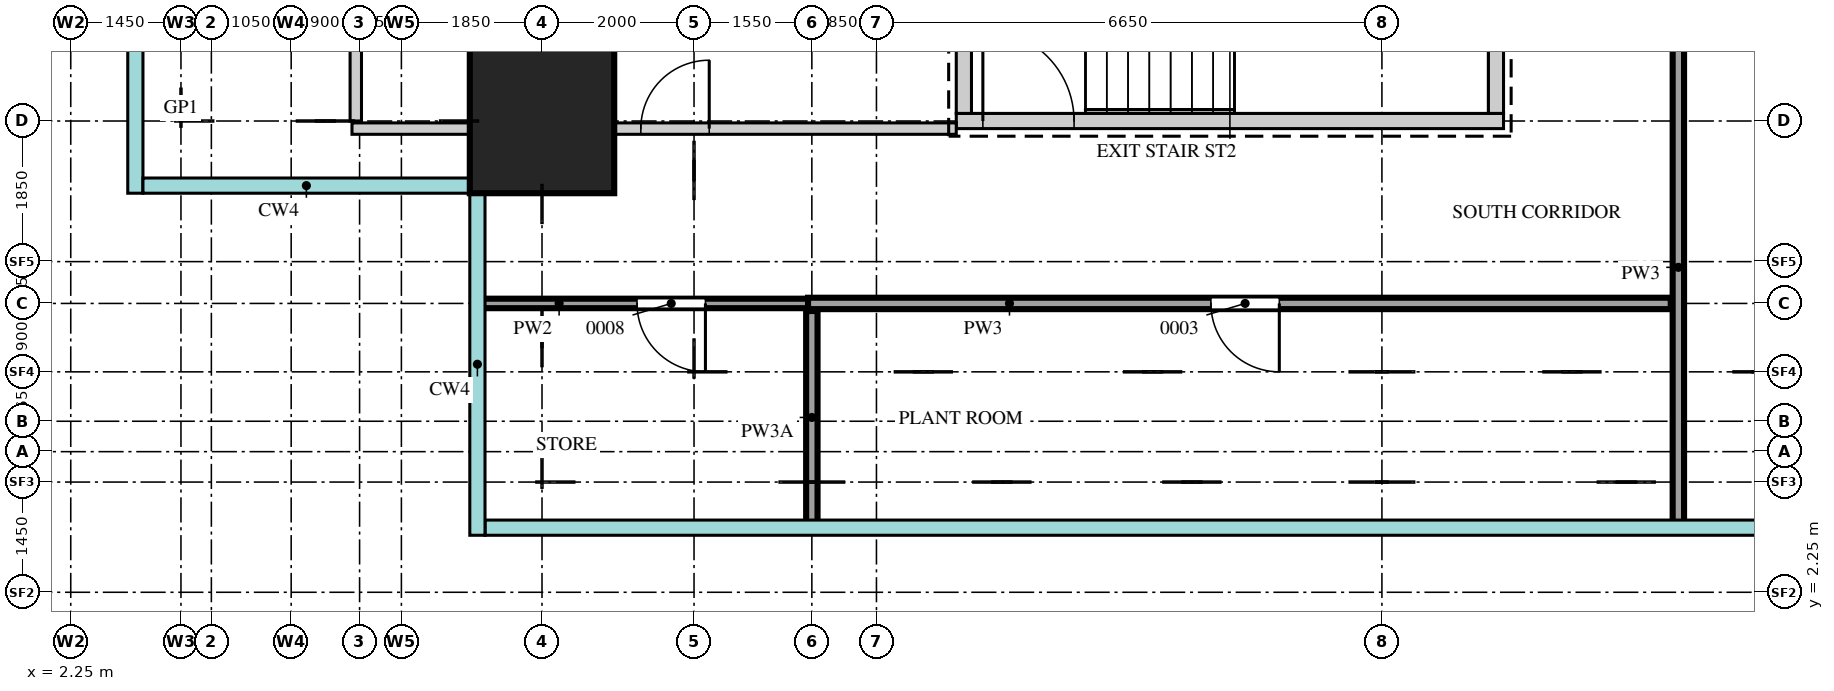
"""IFC4 building model, lengths in metres.
Left out: names, types, materials, properties, quantities, classifications, styles, units other than length and angle.
Written with IfcOpenShell. Run it as: python <this file> out.ifc"""

import sys

from ifc_helpers import new_model, si_unit, direction, frame, frame_2d, origin, origin_2d, place, context, subcontext, project, spatial, rectangle, extrude, source, transform, mapped, element, fill, save


model = new_model("IFC4")
c1 = context("Model", 3, precision=1e-05, world=origin(), true_north=direction((0.0, 1.0)))
c2 = subcontext(c1, "Body", "Model", "MODEL_VIEW")
j1 = project(units=[si_unit("LENGTHUNIT", "METRE"), si_unit("PLANEANGLEUNIT", "RADIAN")], contexts=[c1])
p1 = place(None, origin())
s1 = spatial("IfcSite", under=j1, at=p1, CompositionType="ELEMENT")
p2 = place(p1, origin())
s2 = spatial("IfcBuilding", under=s1, at=p2, CompositionType="ELEMENT")
p3 = place(p2, frame((0.0, 0.0, 216.7)))
s3 = spatial("IfcBuildingStorey", under=s2, at=p3, CompositionType="ELEMENT", Elevation=216.7)
m1 = source(origin(), c2, "Body", "SweptSolid", [
    extrude(rectangle(XDim=7.2, YDim=0.2, at=frame_2d((3.6, 0.0))), origin(), (0.0, 0.0, 1.0), 5.25),
])
p4 = place(p3, frame((13.9, 8.45, 0.0), z_axis=(0.0, 0.0, 1.0), x_axis=(1.0, 0.0, 0.0)))
e1 = element("IfcWall", 1, at=p4, inside=s3, PredefinedType="SHEAR", context=c2, shape_type="MappedRepresentation", body=[
    mapped(m1, transform((0.0, 0.0, 0.0))),
])
m2 = source(origin(), c2, "Body", "SweptSolid", [
    extrude(rectangle(XDim=1.2, YDim=2.1, at=frame_2d((0.6, 1.05))), frame((0.0, 0.11, 0.0), z_axis=(0.0, -1.0, 0.0), x_axis=(1.0, 0.0, 0.0)), (0.0, 0.0, 1.0), 0.22),
])
p5 = place(p4, frame((0.35, 0.0, 0.0)))
e2 = element("IfcOpeningElement", 2, at=p5, cuts=e1, PredefinedType="OPENING", context=c2, shape_type="MappedRepresentation", body=[
    mapped(m2, transform((0.0, 0.0, 0.0))),
])
m3 = source(origin(), c2, "Body", "SweptSolid", [
    extrude(rectangle(XDim=3.35, YDim=0.2, at=frame_2d((1.675, 0.0))), origin(), (0.0, 0.0, 1.0), 5.25),
])
for number, where, z_axis, x_axis in (
    (3, (21.0, 8.55, 0.0), (0.0, 0.0, 1.0), (0.0, 1.0, 0.0)),
    (4, (14.0, 8.55, 0.0), (0.0, 0.0, 1.0), (0.0, 1.0, 0.0)),
):
    element("IfcWall", number, at=place(p3, frame(where, z_axis=z_axis, x_axis=x_axis)), inside=s3, PredefinedType="SHEAR", context=c2, shape_type="MappedRepresentation", body=[
        mapped(m3, transform((0.0, 0.0, 0.0))),
    ])
m4 = source(origin(), c2, "Body", "SweptSolid", [
    extrude(rectangle(XDim=1.9, YDim=1.9, at=origin_2d()), origin(), (0.0, 0.0, 1.0), 5.5),
])
p6 = place(p3, frame((8.45, 8.45, 0.0), z_axis=(0.0, 0.0, 1.0), x_axis=(1.0, 0.0, 0.0)))
e5 = element("IfcColumn", 5, at=p6, inside=s3, PredefinedType="COLUMN", context=c2, shape_type="MappedRepresentation", body=[
    mapped(m4, transform((0.0, 0.0, 0.0))),
])
m5 = source(origin(), c2, "Body", "SweptSolid", [
    extrude(rectangle(XDim=2.8, YDim=0.15, at=frame_2d((1.4, 0.0))), origin(), (0.0, 0.0, 1.0), 4.92),
])
p7 = place(p3, frame((12.0, 3.15, 0.0), z_axis=(0.0, 0.0, 1.0), x_axis=(0.0, 1.0, 0.0)))
e6 = element("IfcWall", 6, at=p7, inside=s3, PredefinedType="PARTITIONING", context=c2, shape_type="MappedRepresentation", body=[
    mapped(m5, transform((0.0, 0.0, 0.0))),
])
m6 = source(origin(), c2, "Body", "SweptSolid", [
    extrude(rectangle(XDim=6.75, YDim=0.15, at=frame_2d((3.375, 0.0))), origin(), (0.0, 0.0, 1.0), 5.25),
])
p8 = place(p3, frame((23.4, 3.15, 0.0), z_axis=(0.0, 0.0, 1.0), x_axis=(0.0, 1.0, 0.0)))
e7 = element("IfcWall", 7, at=p8, inside=s3, PredefinedType="PARTITIONING", context=c2, shape_type="MappedRepresentation", body=[
    mapped(m6, transform((0.0, 0.0, 0.0))),
])
m7 = source(origin(), c2, "Body", "SweptSolid", [
    extrude(rectangle(XDim=4.3, YDim=0.125, at=frame_2d((2.15, 0.0))), origin(), (0.0, 0.0, 1.0), 5.25),
])
p9 = place(p3, frame((7.65, 6.05, 0.0), z_axis=(0.0, 0.0, 1.0), x_axis=(1.0, 0.0, 0.0)))
e8 = element("IfcWall", 8, at=p9, inside=s3, PredefinedType="PARTITIONING", context=c2, shape_type="MappedRepresentation", body=[
    mapped(m7, transform((0.0, 0.0, 0.0))),
])
m8 = source(origin(), c2, "Body", "SweptSolid", [
    extrude(rectangle(XDim=0.9, YDim=2.1, at=frame_2d((0.45, 1.05))), frame((0.0, 0.073, 0.0), z_axis=(0.0, -1.0, 0.0), x_axis=(1.0, 0.0, 0.0)), (0.0, 0.0, 1.0), 0.145),
])
p10 = place(p9, frame((2.05, 0.0, 0.0)))
e9 = element("IfcOpeningElement", 9, at=p10, cuts=e8, PredefinedType="OPENING", context=c2, shape_type="MappedRepresentation", body=[
    mapped(m8, transform((0.0, 0.0, 0.0))),
])
m9 = source(origin(), c2, "Body", "SweptSolid", [
    extrude(rectangle(XDim=11.35, YDim=0.15, at=frame_2d((5.675, 0.0))), origin(), (0.0, 0.0, 1.0), 5.25),
])
p11 = place(p3, frame((11.95, 6.05, 0.0), z_axis=(0.0, 0.0, 1.0), x_axis=(1.0, 0.0, 0.0)))
e10 = element("IfcWall", 10, at=p11, inside=s3, PredefinedType="PARTITIONING", context=c2, shape_type="MappedRepresentation", body=[
    mapped(m9, transform((0.0, 0.0, 0.0))),
])
m10 = source(origin(), c2, "Body", "SweptSolid", [
    extrude(rectangle(XDim=0.9, YDim=2.1, at=frame_2d((0.45, 1.05))), frame((0.0, 0.085, 0.0), z_axis=(0.0, -1.0, 0.0), x_axis=(1.0, 0.0, 0.0)), (0.0, 0.0, 1.0), 0.17),
])
p12 = place(p11, frame((5.3, 0.0, 0.0)))
e11 = element("IfcOpeningElement", 11, at=p12, cuts=e10, PredefinedType="OPENING", context=c2, shape_type="MappedRepresentation", body=[
    mapped(m10, transform((0.0, 0.0, 0.0))),
])
m11 = source(origin(), c2, "Body", "SweptSolid", [
    extrude(rectangle(XDim=7.95, YDim=0.15, at=frame_2d((3.975, 0.0))), origin(), (0.0, 0.0, 1.0), 5.25),
])
p13 = place(p3, frame((5.95, 8.35, 0.0), z_axis=(0.0, 0.0, 1.0), x_axis=(1.0, 0.0, 0.0)))
e12 = element("IfcWall", 12, at=p13, inside=s3, PredefinedType="PARTITIONING", context=c2, shape_type="MappedRepresentation", body=[
    mapped(m11, transform((0.0, 0.0, 0.0))),
])
p14 = place(p13, frame((3.8, 0.0, 0.0)))
e13 = element("IfcOpeningElement", 13, at=p14, cuts=e12, PredefinedType="OPENING", context=c2, shape_type="MappedRepresentation", body=[
    mapped(m10, transform((0.0, 0.0, 0.0))),
])
m12 = source(origin(), c2, "Body", "SweptSolid", [
    extrude(rectangle(XDim=4.05, YDim=0.15, at=frame_2d((2.025, 0.0))), origin(), (0.0, 0.0, 1.0), 5.25),
])
p15 = place(p3, frame((6.0, 8.45, 0.0), z_axis=(0.0, 0.0, 1.0), x_axis=(0.0, 1.0, 0.0)))
e14 = element("IfcWall", 14, at=p15, inside=s3, PredefinedType="PARTITIONING", context=c2, shape_type="MappedRepresentation", body=[
    mapped(m12, transform((0.0, 0.0, 0.0))),
])
m13 = source(origin(), c2, "Body", "SweptSolid", [
    extrude(rectangle(XDim=0.9, YDim=2.1, at=frame_2d((0.45, 1.05))), frame((0.0, 0.025, 0.0), z_axis=(0.0, -1.0, 0.0), x_axis=(1.0, 0.0, 0.0)), (0.0, 0.0, 1.0), 0.05),
])
p16 = place(p10, origin())
e15 = element("IfcDoor", 15, at=p16, inside=s3, OperationType="SINGLE_SWING_RIGHT", PredefinedType="DOOR", context=c2, shape_type="MappedRepresentation", body=[
    mapped(m13, transform((0.0, 0.0, 0.0))),
])
fill(e9, e15)
p17 = place(p12, origin())
e16 = element("IfcDoor", 16, at=p17, inside=s3, OperationType="SINGLE_SWING_RIGHT", PredefinedType="DOOR", context=c2, shape_type="MappedRepresentation", body=[
    mapped(m13, transform((0.0, 0.0, 0.0))),
])
fill(e11, e16)
p18 = place(p14, origin())
e17 = element("IfcDoor", 17, at=p18, inside=s3, OperationType="SINGLE_SWING_LEFT", PredefinedType="DOOR", context=c2, shape_type="MappedRepresentation", body=[
    mapped(m13, transform((0.0, 0.0, 0.0))),
])
fill(e13, e17)
m14 = source(origin(), c2, "Body", "SweptSolid", [
    extrude(rectangle(XDim=1.2, YDim=2.1, at=frame_2d((0.6, 1.05))), frame((0.0, 0.025, 0.0), z_axis=(0.0, -1.0, 0.0), x_axis=(1.0, 0.0, 0.0)), (0.0, 0.0, 1.0), 0.05),
])
p19 = place(p5, origin())
e18 = element("IfcDoor", 18, at=p19, inside=s3, OperationType="SINGLE_SWING_RIGHT", PredefinedType="DOOR", context=c2, shape_type="MappedRepresentation", body=[
    mapped(m14, transform((0.0, 0.0, 0.0))),
])
fill(e2, e18)
save(model, sys.argv[1])
